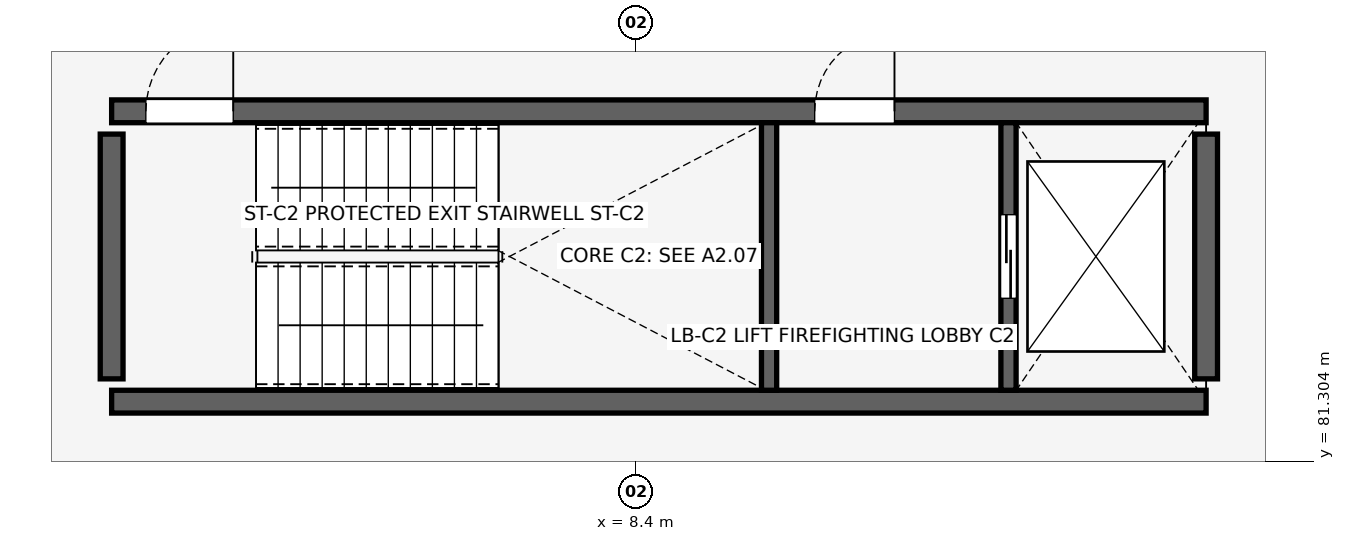
"""IFC4 building model, lengths in metres.
Left out: names, types, materials, properties, quantities, classifications, styles, units other than length and angle.
Written with IfcOpenShell. Run it as: python <this file> out.ifc"""

import sys

from ifc_helpers import new_model, si_unit, direction, frame, frame_2d, origin, place, context, subcontext, project, spatial, rectangle, extrude, element, fill, save


model = new_model("IFC4")
c1 = context("Model", 3, precision=1e-05, world=origin(), true_north=direction((0.0, 1.0)))
c2 = subcontext(c1, "Body", "Model", "MODEL_VIEW")
j1 = project(units=[si_unit("LENGTHUNIT", "METRE"), si_unit("PLANEANGLEUNIT", "RADIAN")], contexts=[c1])
p1 = place(None, origin())
s1 = spatial("IfcSite", under=j1, at=p1, CompositionType="ELEMENT")
p2 = place(p1, origin())
s2 = spatial("IfcBuilding", under=s1, at=p2, CompositionType="ELEMENT")
p3 = place(p2, frame((0.0, 0.0, 9.52)))
s3 = spatial("IfcBuildingStorey", under=s2, at=p3, CompositionType="ELEMENT", Elevation=9.52)
p4 = place(p3, frame((1.5, 82.09, 0.0), z_axis=(0.0, 0.0, 1.0), x_axis=(1.0, 0.0, 0.0)))
e1 = element("IfcWall", 1, at=p4, inside=s3, PredefinedType="SHEAR", context=c2, shape_type="SweptSolid", body=[
    extrude(rectangle(XDim=14.4, YDim=0.3, at=frame_2d((7.2, 0.0))), origin(), (0.0, 0.0, 1.0), 3.57),
])
p5 = place(p3, frame((1.5, 85.91, 0.0), z_axis=(0.0, 0.0, 1.0), x_axis=(1.0, 0.0, 0.0)))
e2 = element("IfcWall", 2, at=p5, inside=s3, PredefinedType="SHEAR", context=c2, shape_type="SweptSolid", body=[
    extrude(rectangle(XDim=14.4, YDim=0.3, at=frame_2d((7.2, 0.0))), origin(), (0.0, 0.0, 1.0), 3.57),
])
p6 = place(p5, frame((0.45, 0.0, 0.0), z_axis=(0.0, 0.0, 1.0), x_axis=(1.0, 0.0, 0.0)))
e3 = element("IfcOpeningElement", 3, at=p6, cuts=e2, PredefinedType="OPENING", context=c2, shape_type="SweptSolid", body=[
    extrude(rectangle(XDim=1.15, YDim=2.15, at=frame_2d((0.575, 1.075))), frame((0.0, 0.16, 0.0), z_axis=(0.0, -1.0, 0.0), x_axis=(1.0, 0.0, 0.0)), (0.0, 0.0, 1.0), 0.32),
])
p7 = place(p5, frame((9.25, 0.0, 0.0), z_axis=(0.0, 0.0, 1.0), x_axis=(1.0, 0.0, 0.0)))
e4 = element("IfcOpeningElement", 4, at=p7, cuts=e2, PredefinedType="OPENING", context=c2, shape_type="SweptSolid", body=[
    extrude(rectangle(XDim=1.05, YDim=2.15, at=frame_2d((0.525, 1.075))), frame((0.0, 0.16, 0.0), z_axis=(0.0, -1.0, 0.0), x_axis=(1.0, 0.0, 0.0)), (0.0, 0.0, 1.0), 0.32),
])
for number, where, z_axis, x_axis in (
    (5, (1.5, 82.39, 0.0), (0.0, 0.0, 1.0), (0.0, 1.0, 0.0)),
    (6, (15.9, 82.39, 0.0), (0.0, 0.0, 1.0), (0.0, 1.0, 0.0)),
):
    element("IfcWall", number, at=place(p3, frame(where, z_axis=z_axis, x_axis=x_axis)), inside=s3, PredefinedType="SHEAR", context=c2, shape_type="SweptSolid", body=[
        extrude(rectangle(XDim=3.22, YDim=0.3, at=frame_2d((1.61, 0.0))), origin(), (0.0, 0.0, 1.0), 3.57),
    ])
p8 = place(p3, frame((10.15, 82.24, 0.0), z_axis=(0.0, 0.0, 1.0), x_axis=(0.0, 1.0, 0.0)))
e7 = element("IfcWall", 7, at=p8, inside=s3, PredefinedType="SHEAR", context=c2, shape_type="SweptSolid", body=[
    extrude(rectangle(XDim=3.52, YDim=0.2, at=frame_2d((1.76, 0.0))), origin(), (0.0, 0.0, 1.0), 3.57),
])
p9 = place(p3, frame((13.3, 82.24, 0.0), z_axis=(0.0, 0.0, 1.0), x_axis=(0.0, 1.0, 0.0)))
e8 = element("IfcWall", 8, at=p9, inside=s3, PredefinedType="SHEAR", context=c2, shape_type="SweptSolid", body=[
    extrude(rectangle(XDim=3.52, YDim=0.2, at=frame_2d((1.76, 0.0))), origin(), (0.0, 0.0, 1.0), 3.57),
])
p10 = place(p9, frame((1.21, 0.0, 0.0), z_axis=(0.0, 0.0, 1.0), x_axis=(1.0, 0.0, 0.0)))
e9 = element("IfcOpeningElement", 9, at=p10, cuts=e8, PredefinedType="OPENING", context=c2, shape_type="SweptSolid", body=[
    extrude(rectangle(XDim=1.1, YDim=2.15, at=frame_2d((0.55, 1.075))), frame((0.0, 0.11, 0.0), z_axis=(0.0, -1.0, 0.0), x_axis=(1.0, 0.0, 0.0)), (0.0, 0.0, 1.0), 0.22),
])
p11 = place(p6, origin())
e10 = element("IfcDoor", 10, at=p11, inside=s3, OperationType="SINGLE_SWING_RIGHT", PredefinedType="DOOR", context=c2, shape_type="SweptSolid", body=[
    extrude(rectangle(XDim=1.15, YDim=2.15, at=frame_2d((0.575, 1.075))), frame((0.0, 0.025, 0.0), z_axis=(0.0, -1.0, 0.0), x_axis=(1.0, 0.0, 0.0)), (0.0, 0.0, 1.0), 0.05),
])
fill(e3, e10)
p12 = place(p7, origin())
e11 = element("IfcDoor", 11, at=p12, inside=s3, OperationType="SINGLE_SWING_RIGHT", PredefinedType="DOOR", context=c2, shape_type="SweptSolid", body=[
    extrude(rectangle(XDim=1.05, YDim=2.15, at=frame_2d((0.525, 1.075))), frame((0.0, 0.025, 0.0), z_axis=(0.0, -1.0, 0.0), x_axis=(1.0, 0.0, 0.0)), (0.0, 0.0, 1.0), 0.05),
])
fill(e4, e11)
p13 = place(p10, origin())
e12 = element("IfcDoor", 12, at=p13, inside=s3, OperationType="DOUBLE_DOOR_SLIDING", PredefinedType="DOOR", context=c2, shape_type="SweptSolid", body=[
    extrude(rectangle(XDim=1.1, YDim=2.15, at=frame_2d((0.55, 1.075))), frame((0.0, 0.025, 0.0), z_axis=(0.0, -1.0, 0.0), x_axis=(1.0, 0.0, 0.0)), (0.0, 0.0, 1.0), 0.05),
])
fill(e9, e12)
save(model, sys.argv[1])
